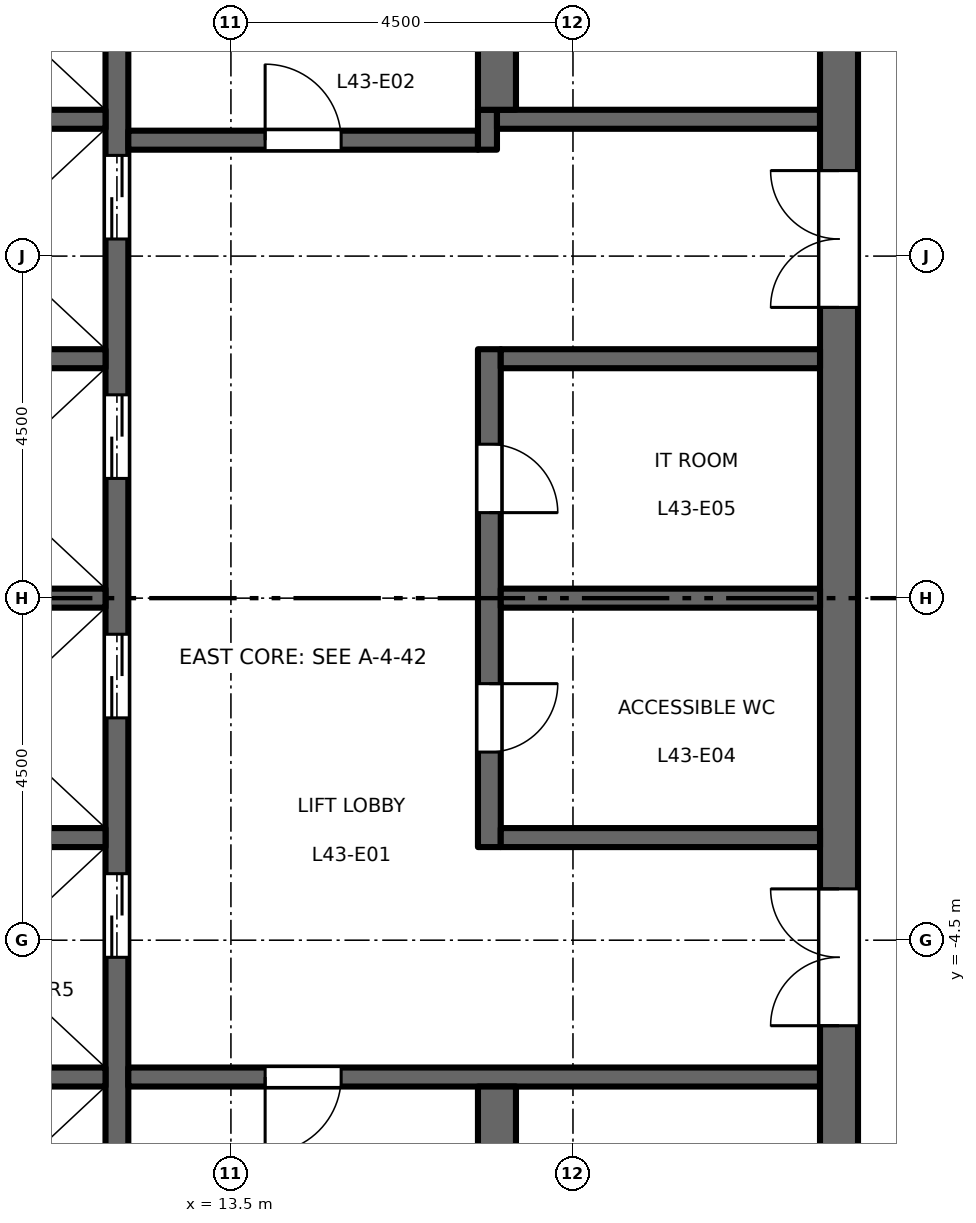
"""IFC4 building model, lengths in metres.
Left out: names, types, materials, properties, quantities, classifications, styles, units other than length and angle.
Written with IfcOpenShell. Run it as: python <this file> out.ifc"""

import sys

from ifc_helpers import new_model, si_unit, direction, frame, frame_2d, origin, place, context, subcontext, project, spatial, rectangle, extrude, element, fill, save


model = new_model("IFC4")
c1 = context("Model", 3, precision=1e-05, world=origin(), true_north=direction((0.0, 1.0)))
c2 = subcontext(c1, "Body", "Model", "MODEL_VIEW")
j1 = project(units=[si_unit("LENGTHUNIT", "METRE"), si_unit("PLANEANGLEUNIT", "RADIAN")], contexts=[c1])
p1 = place(None, origin())
s1 = spatial("IfcSite", under=j1, at=p1, CompositionType="ELEMENT")
p2 = place(p1, origin())
s2 = spatial("IfcBuilding", under=s1, at=p2, CompositionType="ELEMENT")
p3 = place(p2, frame((0.0, 0.0, 201.7)))
s3 = spatial("IfcBuildingStorey", under=s2, at=p3, CompositionType="ELEMENT", Elevation=201.7)
p4 = place(p3, frame((12.0, -9.45, 0.0), z_axis=(0.0, 0.0, 1.0), x_axis=(0.0, 1.0, 0.0)))
e1 = element("IfcWall", 1, at=p4, inside=s3, PredefinedType="SHEAR", context=c2, shape_type="SweptSolid", body=[
    extrude(rectangle(XDim=18.9, YDim=0.3, at=frame_2d((9.45, 0.0))), origin(), (0.0, 0.0, 1.0), 4.35),
])
p5 = place(p4, frame((4.725, 0.0, 0.0)))
e2 = element("IfcOpeningElement", 2, at=p5, cuts=e1, PredefinedType="OPENING", context=c2, shape_type="SweptSolid", body=[
    extrude(rectangle(XDim=1.1, YDim=2.1, at=frame_2d((0.55, 1.05))), frame((0.0, 0.16, 0.0), z_axis=(0.0, -1.0, 0.0), x_axis=(1.0, 0.0, 0.0)), (0.0, 0.0, 1.0), 0.32),
])
p6 = place(p4, frame((7.875, 0.0, 0.0)))
e3 = element("IfcOpeningElement", 3, at=p6, cuts=e1, PredefinedType="OPENING", context=c2, shape_type="SweptSolid", body=[
    extrude(rectangle(XDim=1.1, YDim=2.1, at=frame_2d((0.55, 1.05))), frame((0.0, 0.16, 0.0), z_axis=(0.0, -1.0, 0.0), x_axis=(1.0, 0.0, 0.0)), (0.0, 0.0, 1.0), 0.32),
])
p7 = place(p4, frame((11.025, 0.0, 0.0)))
e4 = element("IfcOpeningElement", 4, at=p7, cuts=e1, PredefinedType="OPENING", context=c2, shape_type="SweptSolid", body=[
    extrude(rectangle(XDim=1.1, YDim=2.1, at=frame_2d((0.55, 1.05))), frame((0.0, 0.16, 0.0), z_axis=(0.0, -1.0, 0.0), x_axis=(1.0, 0.0, 0.0)), (0.0, 0.0, 1.0), 0.32),
])
p8 = place(p4, frame((14.175, 0.0, 0.0)))
e5 = element("IfcOpeningElement", 5, at=p8, cuts=e1, PredefinedType="OPENING", context=c2, shape_type="SweptSolid", body=[
    extrude(rectangle(XDim=1.1, YDim=2.1, at=frame_2d((0.55, 1.05))), frame((0.0, 0.16, 0.0), z_axis=(0.0, -1.0, 0.0), x_axis=(1.0, 0.0, 0.0)), (0.0, 0.0, 1.0), 0.32),
])
p9 = place(p4, frame((16.725, 0.0, 0.0)))
e6 = element("IfcOpeningElement", 6, at=p9, cuts=e1, PredefinedType="OPENING", context=c2, shape_type="SweptSolid", body=[
    extrude(rectangle(XDim=1.2, YDim=2.1, at=frame_2d((0.6, 1.05))), frame((0.0, 0.16, 0.0), z_axis=(0.0, -1.0, 0.0), x_axis=(1.0, 0.0, 0.0)), (0.0, 0.0, 1.0), 0.32),
])
p10 = place(p4, frame((0.975, 0.0, 0.0)))
e7 = element("IfcOpeningElement", 7, at=p10, cuts=e1, PredefinedType="OPENING", context=c2, shape_type="SweptSolid", body=[
    extrude(rectangle(XDim=1.2, YDim=2.1, at=frame_2d((0.6, 1.05))), frame((0.0, 0.16, 0.0), z_axis=(0.0, -1.0, 0.0), x_axis=(1.0, 0.0, 0.0)), (0.0, 0.0, 1.0), 0.32),
])
p11 = place(p3, frame((12.15, 6.025, 0.0), z_axis=(0.0, 0.0, 1.0), x_axis=(1.0, 0.0, 0.0)))
e8 = element("IfcWall", 8, at=p11, inside=s3, PredefinedType="SHEAR", context=c2, shape_type="SweptSolid", body=[
    extrude(rectangle(XDim=4.6, YDim=0.25, at=frame_2d((2.3, 0.0))), origin(), (0.0, 0.0, 1.0), 4.35),
])
p12 = place(p11, frame((1.8, 0.0, 0.0)))
e9 = element("IfcOpeningElement", 9, at=p12, cuts=e8, PredefinedType="OPENING", context=c2, shape_type="SweptSolid", body=[
    extrude(rectangle(XDim=1.0, YDim=2.1, at=frame_2d((0.5, 1.05))), frame((0.0, 0.135, 0.0), z_axis=(0.0, -1.0, 0.0), x_axis=(1.0, 0.0, 0.0)), (0.0, 0.0, 1.0), 0.27),
])
p13 = place(p3, frame((16.875, 5.9, 0.0), z_axis=(0.0, 0.0, 1.0), x_axis=(0.0, 1.0, 0.0)))
e10 = element("IfcWall", 10, at=p13, inside=s3, PredefinedType="SHEAR", context=c2, shape_type="SweptSolid", body=[
    extrude(rectangle(XDim=0.525, YDim=0.25, at=frame_2d((0.263, 0.0))), origin(), (0.0, 0.0, 1.0), 4.35),
])
p14 = place(p3, frame((17.0, 6.3, 0.0), z_axis=(0.0, 0.0, 1.0), x_axis=(1.0, 0.0, 0.0)))
e11 = element("IfcWall", 11, at=p14, inside=s3, PredefinedType="SHEAR", context=c2, shape_type="SweptSolid", body=[
    extrude(rectangle(XDim=4.25, YDim=0.25, at=frame_2d((2.125, 0.0))), origin(), (0.0, 0.0, 1.0), 4.35),
])
p15 = place(p3, frame((12.15, -6.3, 0.0), z_axis=(0.0, 0.0, 1.0), x_axis=(1.0, 0.0, 0.0)))
e12 = element("IfcWall", 12, at=p15, inside=s3, PredefinedType="SHEAR", context=c2, shape_type="SweptSolid", body=[
    extrude(rectangle(XDim=9.1, YDim=0.25, at=frame_2d((4.55, 0.0))), origin(), (0.0, 0.0, 1.0), 4.35),
])
p16 = place(p15, frame((1.8, 0.0, 0.0)))
e13 = element("IfcOpeningElement", 13, at=p16, cuts=e12, PredefinedType="OPENING", context=c2, shape_type="SweptSolid", body=[
    extrude(rectangle(XDim=1.0, YDim=2.1, at=frame_2d((0.5, 1.05))), frame((0.0, 0.135, 0.0), z_axis=(0.0, -1.0, 0.0), x_axis=(1.0, 0.0, 0.0)), (0.0, 0.0, 1.0), 0.27),
])
p17 = place(p3, frame((21.5, -13.0, 0.0), z_axis=(0.0, 0.0, 1.0), x_axis=(0.0, 1.0, 0.0)))
e14 = element("IfcWall", 14, at=p17, inside=s3, PredefinedType="SHEAR", context=c2, shape_type="SweptSolid", body=[
    extrude(rectangle(XDim=26.0, YDim=0.5, at=frame_2d((13.0, 0.0))), origin(), (0.0, 0.0, 1.0), 4.35),
])
p18 = place(p17, frame((16.825, 0.0, 0.0)))
e15 = element("IfcOpeningElement", 15, at=p18, cuts=e14, PredefinedType="OPENING", context=c2, shape_type="SweptSolid", body=[
    extrude(rectangle(XDim=1.8, YDim=2.1, at=frame_2d((0.9, 1.05))), frame((0.0, 0.26, 0.0), z_axis=(0.0, -1.0, 0.0), x_axis=(1.0, 0.0, 0.0)), (0.0, 0.0, 1.0), 0.52),
])
p19 = place(p17, frame((7.375, 0.0, 0.0)))
e16 = element("IfcOpeningElement", 16, at=p19, cuts=e14, PredefinedType="OPENING", context=c2, shape_type="SweptSolid", body=[
    extrude(rectangle(XDim=1.8, YDim=2.1, at=frame_2d((0.9, 1.05))), frame((0.0, 0.26, 0.0), z_axis=(0.0, -1.0, 0.0), x_axis=(1.0, 0.0, 0.0)), (0.0, 0.0, 1.0), 0.52),
])
p20 = place(p3, frame((16.9, -3.275, 0.0), z_axis=(0.0, 0.0, 1.0), x_axis=(0.0, 1.0, 0.0)))
e17 = element("IfcWall", 17, at=p20, inside=s3, PredefinedType="SHEAR", context=c2, shape_type="SweptSolid", body=[
    extrude(rectangle(XDim=6.55, YDim=0.3, at=frame_2d((3.275, 0.0))), origin(), (0.0, 0.0, 1.0), 4.35),
])
p21 = place(p20, frame((1.25, 0.0, 0.0)))
e18 = element("IfcOpeningElement", 18, at=p21, cuts=e17, PredefinedType="OPENING", context=c2, shape_type="SweptSolid", body=[
    extrude(rectangle(XDim=0.9, YDim=2.1, at=frame_2d((0.45, 1.05))), frame((0.0, 0.16, 0.0), z_axis=(0.0, -1.0, 0.0), x_axis=(1.0, 0.0, 0.0)), (0.0, 0.0, 1.0), 0.32),
])
p22 = place(p20, frame((4.4, 0.0, 0.0)))
e19 = element("IfcOpeningElement", 19, at=p22, cuts=e17, PredefinedType="OPENING", context=c2, shape_type="SweptSolid", body=[
    extrude(rectangle(XDim=0.9, YDim=2.1, at=frame_2d((0.45, 1.05))), frame((0.0, 0.16, 0.0), z_axis=(0.0, -1.0, 0.0), x_axis=(1.0, 0.0, 0.0)), (0.0, 0.0, 1.0), 0.32),
])
for number, where, z_axis, x_axis in (
    (20, (17.05, 0.0, 0.0), (0.0, 0.0, 1.0), (1.0, 0.0, 0.0)),
    (21, (17.05, 3.15, 0.0), (0.0, 0.0, 1.0), (1.0, 0.0, 0.0)),
    (22, (17.05, -3.15, 0.0), (0.0, 0.0, 1.0), (1.0, 0.0, 0.0)),
):
    element("IfcWall", number, at=place(p3, frame(where, z_axis=z_axis, x_axis=x_axis)), inside=s3, PredefinedType="SHEAR", context=c2, shape_type="SweptSolid", body=[
        extrude(rectangle(XDim=4.2, YDim=0.25, at=frame_2d((2.1, 0.0))), origin(), (0.0, 0.0, 1.0), 4.35),
    ])
for number, where, z_axis, x_axis in (
    (23, (17.0, 6.425, 0.0), (0.0, 0.0, 1.0), (0.0, 1.0, 0.0)),
    (24, (17.0, -13.0, 0.0), (0.0, 0.0, 1.0), (0.0, 1.0, 0.0)),
):
    element("IfcWall", number, at=place(p3, frame(where, z_axis=z_axis, x_axis=x_axis)), inside=s3, PredefinedType="SHEAR", context=c2, shape_type="SweptSolid", body=[
        extrude(rectangle(XDim=6.575, YDim=0.5, at=frame_2d((3.288, 0.0))), origin(), (0.0, 0.0, 1.0), 4.35),
    ])
for number, where, z_axis, x_axis in (
    (25, (8.75, 0.0, 0.0), (0.0, 0.0, 1.0), (1.0, 0.0, 0.0)),
    (26, (8.75, 3.15, 0.0), (0.0, 0.0, 1.0), (1.0, 0.0, 0.0)),
    (27, (8.75, 6.3, 0.0), (0.0, 0.0, 1.0), (1.0, 0.0, 0.0)),
    (28, (8.75, -3.15, 0.0), (0.0, 0.0, 1.0), (1.0, 0.0, 0.0)),
    (29, (8.75, -6.3, 0.0), (0.0, 0.0, 1.0), (1.0, 0.0, 0.0)),
):
    element("IfcWall", number, at=place(p3, frame(where, z_axis=z_axis, x_axis=x_axis)), inside=s3, PredefinedType="SHEAR", context=c2, shape_type="SweptSolid", body=[
        extrude(rectangle(XDim=3.1, YDim=0.25, at=frame_2d((1.55, 0.0))), origin(), (0.0, 0.0, 1.0), 4.35),
    ])
p23 = place(p12, origin())
e30 = element("IfcDoor", 30, at=p23, inside=s3, OperationType="SINGLE_SWING_RIGHT", PredefinedType="DOOR", context=c2, shape_type="SweptSolid", body=[
    extrude(rectangle(XDim=1.0, YDim=2.1, at=frame_2d((0.5, 1.05))), frame((0.0, 0.025, 0.0), z_axis=(0.0, -1.0, 0.0), x_axis=(1.0, 0.0, 0.0)), (0.0, 0.0, 1.0), 0.05),
])
fill(e9, e30)
p24 = place(p16, origin())
e31 = element("IfcDoor", 31, at=p24, inside=s3, OperationType="SINGLE_SWING_LEFT", PredefinedType="DOOR", context=c2, shape_type="SweptSolid", body=[
    extrude(rectangle(XDim=1.0, YDim=2.1, at=frame_2d((0.5, 1.05))), frame((0.0, 0.025, 0.0), z_axis=(0.0, -1.0, 0.0), x_axis=(1.0, 0.0, 0.0)), (0.0, 0.0, 1.0), 0.05),
])
fill(e13, e31)
p25 = place(p18, origin())
e32 = element("IfcDoor", 32, at=p25, inside=s3, OperationType="DOUBLE_DOOR_DOUBLE_SWING", PredefinedType="DOOR", context=c2, shape_type="SweptSolid", body=[
    extrude(rectangle(XDim=1.8, YDim=2.1, at=frame_2d((0.9, 1.05))), frame((0.0, 0.025, 0.0), z_axis=(0.0, -1.0, 0.0), x_axis=(1.0, 0.0, 0.0)), (0.0, 0.0, 1.0), 0.05),
])
fill(e15, e32)
p26 = place(p19, origin())
e33 = element("IfcDoor", 33, at=p26, inside=s3, OperationType="DOUBLE_DOOR_DOUBLE_SWING", PredefinedType="DOOR", context=c2, shape_type="SweptSolid", body=[
    extrude(rectangle(XDim=1.8, YDim=2.1, at=frame_2d((0.9, 1.05))), frame((0.0, 0.025, 0.0), z_axis=(0.0, -1.0, 0.0), x_axis=(1.0, 0.0, 0.0)), (0.0, 0.0, 1.0), 0.05),
])
fill(e16, e33)
p27 = place(p5, origin())
e34 = element("IfcDoor", 34, at=p27, inside=s3, OperationType="DOUBLE_DOOR_SLIDING", PredefinedType="DOOR", context=c2, shape_type="SweptSolid", body=[
    extrude(rectangle(XDim=1.1, YDim=2.1, at=frame_2d((0.55, 1.05))), frame((0.0, 0.025, 0.0), z_axis=(0.0, -1.0, 0.0), x_axis=(1.0, 0.0, 0.0)), (0.0, 0.0, 1.0), 0.05),
])
fill(e2, e34)
p28 = place(p6, origin())
e35 = element("IfcDoor", 35, at=p28, inside=s3, OperationType="DOUBLE_DOOR_SLIDING", PredefinedType="DOOR", context=c2, shape_type="SweptSolid", body=[
    extrude(rectangle(XDim=1.1, YDim=2.1, at=frame_2d((0.55, 1.05))), frame((0.0, 0.025, 0.0), z_axis=(0.0, -1.0, 0.0), x_axis=(1.0, 0.0, 0.0)), (0.0, 0.0, 1.0), 0.05),
])
fill(e3, e35)
p29 = place(p7, origin())
e36 = element("IfcDoor", 36, at=p29, inside=s3, OperationType="DOUBLE_DOOR_SLIDING", PredefinedType="DOOR", context=c2, shape_type="SweptSolid", body=[
    extrude(rectangle(XDim=1.1, YDim=2.1, at=frame_2d((0.55, 1.05))), frame((0.0, 0.025, 0.0), z_axis=(0.0, -1.0, 0.0), x_axis=(1.0, 0.0, 0.0)), (0.0, 0.0, 1.0), 0.05),
])
fill(e4, e36)
p30 = place(p8, origin())
e37 = element("IfcDoor", 37, at=p30, inside=s3, OperationType="DOUBLE_DOOR_SLIDING", PredefinedType="DOOR", context=c2, shape_type="SweptSolid", body=[
    extrude(rectangle(XDim=1.1, YDim=2.1, at=frame_2d((0.55, 1.05))), frame((0.0, 0.025, 0.0), z_axis=(0.0, -1.0, 0.0), x_axis=(1.0, 0.0, 0.0)), (0.0, 0.0, 1.0), 0.05),
])
fill(e5, e37)
p31 = place(p21, origin())
e38 = element("IfcDoor", 38, at=p31, inside=s3, OperationType="SINGLE_SWING_RIGHT", PredefinedType="DOOR", context=c2, shape_type="SweptSolid", body=[
    extrude(rectangle(XDim=0.9, YDim=2.1, at=frame_2d((0.45, 1.05))), frame((0.0, 0.025, 0.0), z_axis=(0.0, -1.0, 0.0), x_axis=(1.0, 0.0, 0.0)), (0.0, 0.0, 1.0), 0.05),
])
fill(e18, e38)
p32 = place(p22, origin())
e39 = element("IfcDoor", 39, at=p32, inside=s3, OperationType="SINGLE_SWING_LEFT", PredefinedType="DOOR", context=c2, shape_type="SweptSolid", body=[
    extrude(rectangle(XDim=0.9, YDim=2.1, at=frame_2d((0.45, 1.05))), frame((0.0, 0.025, 0.0), z_axis=(0.0, -1.0, 0.0), x_axis=(1.0, 0.0, 0.0)), (0.0, 0.0, 1.0), 0.05),
])
fill(e19, e39)
save(model, sys.argv[1])
